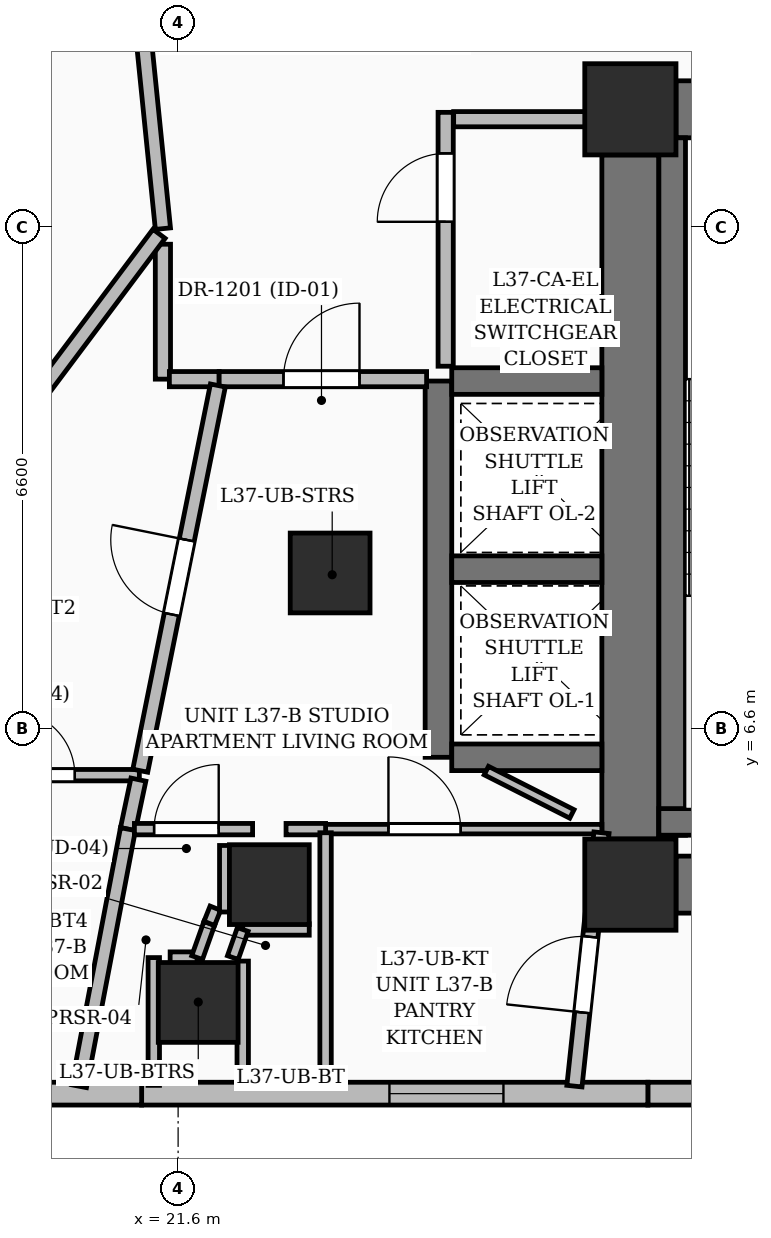
"""IFC4 building model, lengths in metres.
Left out: names, types, materials, properties, quantities, classifications, styles, units other than length and angle.
Written with IfcOpenShell. Run it as: python <this file> out.ifc"""

import sys

from ifc_helpers import new_model, si_unit, direction, frame, frame_2d, origin, origin_2d, place, context, subcontext, project, spatial, rectangle, extrude, element, fill, save


model = new_model("IFC4")
c1 = context("Model", 3, precision=1e-05, world=origin(), true_north=direction((0.0, 1.0)))
c2 = subcontext(c1, "Body", "Model", "MODEL_VIEW")
j1 = project(units=[si_unit("LENGTHUNIT", "METRE"), si_unit("PLANEANGLEUNIT", "RADIAN")], contexts=[c1])
p1 = place(None, origin())
s1 = spatial("IfcSite", under=j1, at=p1, CompositionType="ELEMENT")
p2 = place(p1, origin())
s2 = spatial("IfcBuilding", under=s1, at=p2, CompositionType="ELEMENT")
p3 = place(p2, frame((0.0, 0.0, 146.4)))
s3 = spatial("IfcBuildingStorey", under=s2, at=p3, CompositionType="ELEMENT", Elevation=146.4)
for number, where, z_axis, x_axis in (
    (1, (27.55, 4.55, 0.0), (0.0, 0.0, 1.0), (1.0, 0.0, 0.0)),
    (2, (27.55, 14.75, 0.0), (0.0, 0.0, 1.0), (1.0, 0.0, 0.0)),
):
    element("IfcColumn", number, at=place(p3, frame(where, z_axis=z_axis, x_axis=x_axis)), inside=s3, PredefinedType="COLUMN", context=c2, shape_type="SweptSolid", body=[
        extrude(rectangle(XDim=1.2, YDim=1.2, at=origin_2d()), origin(), (0.0, 0.0, 1.0), 3.6),
    ])
for number, where, z_axis, x_axis in (
    (3, (22.8, 4.55, 0.0), (0.0, 0.0, 1.0), (1.0, 0.0, 0.0)),
    (4, (23.6, 8.65, 0.0), (0.0, 0.0, 1.0), (1.0, 0.0, 0.0)),
):
    element("IfcColumn", number, at=place(p3, frame(where, z_axis=z_axis, x_axis=x_axis)), inside=s3, PredefinedType="COLUMN", context=c2, shape_type="SweptSolid", body=[
        extrude(rectangle(XDim=1.05, YDim=1.05, at=origin_2d()), origin(), (0.0, 0.0, 1.0), 3.6),
    ])
p4 = place(p3, frame((28.15, 4.55, 0.0), z_axis=(0.0, 0.0, 1.0), x_axis=(1.0, 0.0, 0.0)))
e5 = element("IfcWall", 5, at=p4, inside=s3, PredefinedType="SHEAR", context=c2, shape_type="SweptSolid", body=[
    extrude(rectangle(XDim=6.4, YDim=0.75, at=frame_2d((3.2, 0.0))), origin(), (0.0, 0.0, 1.0), 3.6),
])
p5 = place(p3, frame((28.15, 14.75, 0.0), z_axis=(0.0, 0.0, 1.0), x_axis=(1.0, 0.0, 0.0)))
e6 = element("IfcWall", 6, at=p5, inside=s3, PredefinedType="SHEAR", context=c2, shape_type="SweptSolid", body=[
    extrude(rectangle(XDim=6.4, YDim=0.75, at=frame_2d((3.2, 0.0))), origin(), (0.0, 0.0, 1.0), 3.6),
])
p6 = place(p5, frame((1.025, 0.0, 0.0)))
e7 = element("IfcOpeningElement", 7, at=p6, cuts=e6, PredefinedType="OPENING", context=c2, shape_type="SweptSolid", body=[
    extrude(rectangle(XDim=1.05, YDim=2.15, at=frame_2d((0.525, 1.075))), frame((0.0, 0.385, 0.0), z_axis=(0.0, -1.0, 0.0), x_axis=(1.0, 0.0, 0.0)), (0.0, 0.0, 1.0), 0.77),
])
p7 = place(p5, frame((3.8, 0.0, 0.0)))
e8 = element("IfcOpeningElement", 8, at=p7, cuts=e6, PredefinedType="OPENING", context=c2, shape_type="SweptSolid", body=[
    extrude(rectangle(XDim=1.1, YDim=2.2, at=frame_2d((0.55, 1.1))), frame((0.0, 0.385, 0.0), z_axis=(0.0, -1.0, 0.0), x_axis=(1.0, 0.0, 0.0)), (0.0, 0.0, 1.0), 0.77),
])
p8 = place(p3, frame((27.55, 5.15, 0.0), z_axis=(0.0, 0.0, 1.0), x_axis=(0.0, 1.0, 0.0)))
e9 = element("IfcWall", 9, at=p8, inside=s3, PredefinedType="SHEAR", context=c2, shape_type="SweptSolid", body=[
    extrude(rectangle(XDim=9.0, YDim=0.75, at=frame_2d((4.5, 0.0))), origin(), (0.0, 0.0, 1.0), 3.6),
])
p9 = place(p3, frame((28.1, 5.2, 0.0), z_axis=(0.0, 0.0, 1.0), x_axis=(0.0, 1.0, 0.0)))
e10 = element("IfcWall", 10, at=p9, inside=s3, PredefinedType="SOLIDWALL", context=c2, shape_type="SweptSolid", body=[
    extrude(rectangle(XDim=9.175, YDim=0.35, at=frame_2d((4.587, 0.0))), origin(), (0.0, 0.0, 1.0), 3.6),
])
p10 = place(p3, frame((27.925, 5.375, 0.0), z_axis=(0.0, 0.0, 1.0), x_axis=(1.0, 0.0, 0.0)))
e11 = element("IfcWall", 11, at=p10, inside=s3, PredefinedType="SOLIDWALL", context=c2, shape_type="SweptSolid", body=[
    extrude(rectangle(XDim=3.55, YDim=0.35, at=frame_2d((1.775, 0.0))), origin(), (0.0, 0.0, 1.0), 3.6),
])
p11 = place(p3, frame((25.025, 6.225, 0.0), z_axis=(0.0, 0.0, 1.0), x_axis=(0.0, 1.0, 0.0)))
e12 = element("IfcWall", 12, at=p11, inside=s3, PredefinedType="SOLIDWALL", context=c2, shape_type="SweptSolid", body=[
    extrude(rectangle(XDim=4.95, YDim=0.35, at=frame_2d((2.475, 0.0))), origin(), (0.0, 0.0, 1.0), 3.6),
])
for number, where, z_axis, x_axis in (
    (13, (25.2, 6.225, 0.0), (0.0, 0.0, 1.0), (1.0, 0.0, 0.0)),
    (14, (25.2, 8.7, 0.0), (0.0, 0.0, 1.0), (1.0, 0.0, 0.0)),
    (15, (25.2, 11.175, 0.0), (0.0, 0.0, 1.0), (1.0, 0.0, 0.0)),
):
    element("IfcWall", number, at=place(p3, frame(where, z_axis=z_axis, x_axis=x_axis)), inside=s3, PredefinedType="SOLIDWALL", context=c2, shape_type="SweptSolid", body=[
        extrude(rectangle(XDim=1.975, YDim=0.35, at=frame_2d((0.988, 0.0))), origin(), (0.0, 0.0, 1.0), 3.6),
    ])
p12 = place(p3, frame((21.864, 3.0, 0.0), z_axis=(0.0, 0.0, 1.0), x_axis=(1.0, 0.0, 0.0)))
e16 = element("IfcColumn", 16, at=p12, inside=s3, PredefinedType="COLUMN", context=c2, shape_type="SweptSolid", body=[
    extrude(rectangle(XDim=1.05, YDim=1.05, at=origin_2d()), origin(), (0.0, 0.0, 1.0), 3.6),
])
p13 = place(p3, frame((34.16, 1.8, 0.0), z_axis=(0.0, 0.0, 1.0), x_axis=(-1.0, 0.0, 0.0)))
e17 = element("IfcWall", 17, at=p13, inside=s3, PredefinedType="SOLIDWALL", context=c2, shape_type="SweptSolid", body=[
    extrude(rectangle(XDim=6.38, YDim=0.3, at=frame_2d((3.19, 0.0))), origin(), (0.0, 0.0, 1.0), 3.35),
])
p14 = place(p13, frame((2.195, 0.0, 0.55)))
e18 = element("IfcOpeningElement", 18, at=p14, cuts=e17, PredefinedType="OPENING", context=c2, shape_type="SweptSolid", body=[
    extrude(rectangle(XDim=1.6, YDim=2.2, at=frame_2d((0.8, 1.1))), frame((0.0, 0.16, 0.0), z_axis=(0.0, -1.0, 0.0), x_axis=(1.0, 0.0, 0.0)), (0.0, 0.0, 1.0), 0.32),
])
p15 = place(p3, frame((27.78, 1.8, 0.0), z_axis=(0.0, 0.0, 1.0), x_axis=(-1.0, 0.0, 0.0)))
e19 = element("IfcWall", 19, at=p15, inside=s3, PredefinedType="SOLIDWALL", context=c2, shape_type="SweptSolid", body=[
    extrude(rectangle(XDim=6.66, YDim=0.3, at=frame_2d((3.33, 0.0))), origin(), (0.0, 0.0, 1.0), 3.35),
])
p16 = place(p15, frame((1.9, 0.0, 0.6)))
e20 = element("IfcOpeningElement", 20, at=p16, cuts=e19, PredefinedType="OPENING", context=c2, shape_type="SweptSolid", body=[
    extrude(rectangle(XDim=1.5, YDim=2.1, at=frame_2d((0.75, 1.05))), frame((0.0, 0.16, 0.0), z_axis=(0.0, -1.0, 0.0), x_axis=(1.0, 0.0, 0.0)), (0.0, 0.0, 1.0), 0.32),
])
p17 = place(p3, frame((21.12, 1.8, 0.0), z_axis=(0.0, 0.0, 1.0), x_axis=(-1.0, 0.0, 0.0)))
e21 = element("IfcWall", 21, at=p17, inside=s3, PredefinedType="SOLIDWALL", context=c2, shape_type="SweptSolid", body=[
    extrude(rectangle(XDim=6.66, YDim=0.3, at=frame_2d((3.33, 0.0))), origin(), (0.0, 0.0, 1.0), 3.35),
])
p18 = place(p17, frame((3.3, 0.0, 0.8)))
e22 = element("IfcOpeningElement", 22, at=p18, cuts=e21, PredefinedType="OPENING", context=c2, shape_type="SweptSolid", body=[
    extrude(rectangle(XDim=1.2, YDim=1.8, at=frame_2d((0.6, 0.9))), frame((0.0, 0.16, 0.0), z_axis=(0.0, -1.0, 0.0), x_axis=(1.0, 0.0, 0.0)), (0.0, 0.0, 1.0), 0.32),
])
p19 = place(p3, frame((25.12, 11.37, 0.0), z_axis=(0.0, 0.0, 1.0), x_axis=(0.0, 1.0, 0.0)))
e23 = element("IfcWall", 23, at=p19, inside=s3, PredefinedType="PARTITIONING", context=c2, shape_type="SweptSolid", body=[
    extrude(rectangle(XDim=3.34, YDim=0.2, at=frame_2d((1.67, 0.0))), origin(), (0.0, 0.0, 1.0), 3.35),
])
p20 = place(p19, frame((1.9, 0.0, 0.0)))
e24 = element("IfcOpeningElement", 24, at=p20, cuts=e23, PredefinedType="OPENING", context=c2, shape_type="SweptSolid", body=[
    extrude(rectangle(XDim=0.9, YDim=2.1, at=frame_2d((0.45, 1.05))), frame((0.0, 0.11, 0.0), z_axis=(0.0, -1.0, 0.0), x_axis=(1.0, 0.0, 0.0)), (0.0, 0.0, 1.0), 0.22),
])
p21 = place(p3, frame((25.225, 14.62, 0.0), z_axis=(0.0, 0.0, 1.0), x_axis=(1.0, 0.0, 0.0)))
e25 = element("IfcWall", 25, at=p21, inside=s3, PredefinedType="PARTITIONING", context=c2, shape_type="SweptSolid", body=[
    extrude(rectangle(XDim=1.935, YDim=0.2, at=frame_2d((0.967, 0.0))), origin(), (0.0, 0.0, 1.0), 3.35),
])
p22 = place(p3, frame((21.4, 12.975, 0.0), z_axis=(0.0, 0.0, 1.0), x_axis=(0.0, -1.0, 0.0)))
e26 = element("IfcWall", 26, at=p22, inside=s3, PredefinedType="PARTITIONING", context=c2, shape_type="SweptSolid", body=[
    extrude(rectangle(XDim=1.775, YDim=0.2, at=frame_2d((0.888, 0.0))), origin(), (0.0, 0.0, 1.0), 3.35),
])
p23 = place(p3, frame((21.485, 11.2, 0.0), z_axis=(0.0, 0.0, 1.0), x_axis=(1.0, 0.0, 0.0)))
e27 = element("IfcWall", 27, at=p23, inside=s3, PredefinedType="PARTITIONING", context=c2, shape_type="SweptSolid", body=[
    extrude(rectangle(XDim=0.655, YDim=0.2, at=frame_2d((0.327, 0.0))), origin(), (0.0, 0.0, 1.0), 2.787),
])
p24 = place(p3, frame((22.14, 11.2, 0.0), z_axis=(0.0, 0.0, 1.0), x_axis=(1.0, 0.0, 0.0)))
e28 = element("IfcWall", 28, at=p24, inside=s3, PredefinedType="PARTITIONING", context=c2, shape_type="SweptSolid", body=[
    extrude(rectangle(XDim=2.729, YDim=0.2, at=frame_2d((1.365, 0.0))), origin(), (0.0, 0.0, 1.0), 3.35),
])
p25 = place(p24, frame((0.846, 0.0, 0.0)))
e29 = element("IfcOpeningElement", 29, at=p25, cuts=e28, PredefinedType="OPENING", context=c2, shape_type="SweptSolid", body=[
    extrude(rectangle(XDim=1.0, YDim=2.2, at=frame_2d((0.5, 1.1))), frame((0.0, 0.11, 0.0), z_axis=(0.0, -1.0, 0.0), x_axis=(1.0, 0.0, 0.0)), (0.0, 0.0, 1.0), 0.22),
])
p26 = place(p3, frame((20.938, 17.744, 0.0), z_axis=(0.0, 0.0, 1.0), x_axis=(0.100694538304, -0.994917388508, 0.0)))
e30 = element("IfcWall", 30, at=p26, inside=s3, PredefinedType="PARTITIONING", context=c2, shape_type="SweptSolid", body=[
    extrude(rectangle(XDim=4.587, YDim=0.2, at=frame_2d((2.293, 0.0))), origin(), (0.0, 0.0, 1.0), 2.57),
])
p27 = place(p3, frame((18.66, 5.99, 0.0), z_axis=(0.0, 0.0, 1.0), x_axis=(1.0, 0.0, 0.0)))
e31 = element("IfcWall", 31, at=p27, inside=s3, PredefinedType="PARTITIONING", context=c2, shape_type="SweptSolid", body=[
    extrude(rectangle(XDim=2.43, YDim=0.15, at=frame_2d((1.215, 0.0))), origin(), (0.0, 0.0, 1.0), 2.57),
])
p28 = place(p27, frame((0.731, 0.0, 0.0)))
e32 = element("IfcOpeningElement", 32, at=p28, cuts=e31, PredefinedType="OPENING", context=c2, shape_type="SweptSolid", body=[
    extrude(rectangle(XDim=0.85, YDim=2.1, at=frame_2d((0.425, 1.05))), frame((0.0, 0.085, 0.0), z_axis=(0.0, -1.0, 0.0), x_axis=(1.0, 0.0, 0.0)), (0.0, 0.0, 1.0), 0.17),
])
p29 = place(p3, frame((21.102, 6.049, 0.0), z_axis=(0.0, 0.0, 1.0), x_axis=(0.197587137943, 0.9802853273, 0.0)))
e33 = element("IfcWall", 33, at=p29, inside=s3, PredefinedType="PARTITIONING", context=c2, shape_type="SweptSolid", body=[
    extrude(rectangle(XDim=5.17, YDim=0.2, at=frame_2d((2.585, 0.0))), origin(), (0.0, 0.0, 1.0), 2.393),
])
p30 = place(p29, frame((2.097, 0.0, 0.0)))
e34 = element("IfcOpeningElement", 34, at=p30, cuts=e33, PredefinedType="OPENING", context=c2, shape_type="SweptSolid", body=[
    extrude(rectangle(XDim=1.0, YDim=2.2, at=frame_2d((0.5, 1.1))), frame((0.0, 0.11, 0.0), z_axis=(0.0, -1.0, 0.0), x_axis=(1.0, 0.0, 0.0)), (0.0, 0.0, 1.0), 0.22),
])
p31 = place(p3, frame((21.349, 13.112, 0.0), z_axis=(0.0, 0.0, 1.0), x_axis=(-0.599823501839, -0.800132343204, 0.0)))
e35 = element("IfcWall", 35, at=p31, inside=s3, PredefinedType="PARTITIONING", context=c2, shape_type="SweptSolid", body=[
    extrude(rectangle(XDim=8.854, YDim=0.2, at=frame_2d((4.427, 0.0))), origin(), (0.0, 0.0, 1.0), 2.393),
])
p32 = place(p3, frame((20.94, 5.28, 0.0), z_axis=(0.0, 0.0, 1.0), x_axis=(0.206823588426, 0.978378251634, 0.0)))
e36 = element("IfcWall", 36, at=p32, inside=s3, PredefinedType="PARTITIONING", context=c2, shape_type="SweptSolid", body=[
    extrude(rectangle(XDim=0.666, YDim=0.2, at=frame_2d((0.333, 0.0))), origin(), (0.0, 0.0, 1.0), 3.35),
])
p33 = place(p3, frame((20.296, 1.898, 0.0), z_axis=(0.0, 0.0, 1.0), x_axis=(0.187066487998, 0.982347254828, 0.0)))
e37 = element("IfcWall", 37, at=p33, inside=s3, PredefinedType="PARTITIONING", context=c2, shape_type="SweptSolid", body=[
    extrude(rectangle(XDim=3.443, YDim=0.2, at=frame_2d((1.721, 0.0))), origin(), (0.0, 0.0, 1.0), 2.57),
])
p34 = place(p3, frame((23.54, 5.28, 0.0), z_axis=(0.0, 0.0, 1.0), x_axis=(1.0, 0.0, 0.0)))
e38 = element("IfcWall", 38, at=p34, inside=s3, PredefinedType="PARTITIONING", context=c2, shape_type="SweptSolid", body=[
    extrude(rectangle(XDim=3.635, YDim=0.125, at=frame_2d((1.817, 0.0))), origin(), (0.0, 0.0, 1.0), 3.35),
])
p35 = place(p34, frame((0.827, 0.0, 0.0)))
e39 = element("IfcOpeningElement", 39, at=p35, cuts=e38, PredefinedType="OPENING", context=c2, shape_type="SweptSolid", body=[
    extrude(rectangle(XDim=0.95, YDim=2.2, at=frame_2d((0.475, 1.1))), frame((0.0, 0.072, 0.0), z_axis=(0.0, -1.0, 0.0), x_axis=(1.0, 0.0, 0.0)), (0.0, 0.0, 1.0), 0.145),
])
p36 = place(p3, frame((21.025, 5.28, 0.0), z_axis=(0.0, 0.0, 1.0), x_axis=(1.0, 0.0, 0.0)))
e40 = element("IfcWall", 40, at=p36, inside=s3, PredefinedType="PARTITIONING", context=c2, shape_type="SweptSolid", body=[
    extrude(rectangle(XDim=1.555, YDim=0.15, at=frame_2d((0.778, 0.0))), origin(), (0.0, 0.0, 1.0), 3.35),
])
p37 = place(p36, frame((0.259, 0.0, 0.0)))
e41 = element("IfcOpeningElement", 41, at=p37, cuts=e40, PredefinedType="OPENING", context=c2, shape_type="SweptSolid", body=[
    extrude(rectangle(XDim=0.85, YDim=2.1, at=frame_2d((0.425, 1.05))), frame((0.0, 0.085, 0.0), z_axis=(0.0, -1.0, 0.0), x_axis=(1.0, 0.0, 0.0)), (0.0, 0.0, 1.0), 0.17),
])
p38 = place(p3, frame((23.02, 5.28, 0.0), z_axis=(0.0, 0.0, 1.0), x_axis=(1.0, 0.0, 0.0)))
e42 = element("IfcWall", 42, at=p38, inside=s3, PredefinedType="PARTITIONING", context=c2, shape_type="SweptSolid", body=[
    extrude(rectangle(XDim=0.52, YDim=0.15, at=frame_2d((0.26, 0.0))), origin(), (0.0, 0.0, 1.0), 3.35),
])
p39 = place(p3, frame((23.54, 5.232, 0.0), z_axis=(0.0, 0.0, 1.0), x_axis=(0.0, -1.0, 0.0)))
e43 = element("IfcWall", 43, at=p39, inside=s3, PredefinedType="PARTITIONING", context=c2, shape_type="SweptSolid", body=[
    extrude(rectangle(XDim=3.333, YDim=0.15, at=frame_2d((1.666, 0.0))), origin(), (0.0, 0.0, 1.0), 2.436),
])
p40 = place(p3, frame((26.814, 1.899, 0.0), z_axis=(0.0, 0.0, 1.0), x_axis=(0.106162893961, 0.994348751669, 0.0)))
e44 = element("IfcWall", 44, at=p40, inside=s3, PredefinedType="PARTITIONING", context=c2, shape_type="SweptSolid", body=[
    extrude(rectangle(XDim=3.353, YDim=0.2, at=frame_2d((1.677, 0.0))), origin(), (0.0, 0.0, 1.0), 2.57),
])
p41 = place(p40, frame((0.975, 0.0, 0.0)))
e45 = element("IfcOpeningElement", 45, at=p41, cuts=e44, PredefinedType="OPENING", context=c2, shape_type="SweptSolid", body=[
    extrude(rectangle(XDim=1.0, YDim=2.2, at=frame_2d((0.5, 1.1))), frame((0.0, 0.11, 0.0), z_axis=(0.0, -1.0, 0.0), x_axis=(1.0, 0.0, 0.0)), (0.0, 0.0, 1.0), 0.22),
])
p42 = place(p3, frame((25.655, 6.05, 0.0), z_axis=(0.0, 0.0, 1.0), x_axis=(0.892014972044, -0.452005851344, 0.0)))
e46 = element("IfcWall", 46, at=p42, inside=s3, PredefinedType="PARTITIONING", context=c2, shape_type="SweptSolid", body=[
    extrude(rectangle(XDim=1.262, YDim=0.125, at=frame_2d((0.631, 0.0))), origin(), (0.0, 0.0, 1.0), 3.35),
])
p43 = place(p3, frame((23.325, 3.96, 0.0), z_axis=(0.0, 0.0, 1.0), x_axis=(-1.0, 0.0, 0.0)))
e47 = element("IfcWall", 47, at=p43, inside=s3, PredefinedType="PARTITIONING", context=c2, shape_type="SweptSolid", body=[
    extrude(rectangle(XDim=0.875, YDim=0.15, at=frame_2d((0.438, 0.0))), origin(), (0.0, 0.0, 1.0), 3.35),
])
p44 = place(p3, frame((22.45, 3.96, 0.0), z_axis=(0.0, 0.0, 1.0), x_axis=(-0.331321182958, -0.943518030418, 0.0)))
e48 = element("IfcWall", 48, at=p44, inside=s3, PredefinedType="PARTITIONING", context=c2, shape_type="SweptSolid", body=[
    extrude(rectangle(XDim=0.392, YDim=0.15, at=frame_2d((0.196, 0.0))), origin(), (0.0, 0.0, 1.0), 3.35),
])
p45 = place(p3, frame((22.45, 3.544, 0.0), z_axis=(0.0, 0.0, 1.0), x_axis=(0.0, -1.0, 0.0)))
e49 = element("IfcWall", 49, at=p45, inside=s3, PredefinedType="PARTITIONING", context=c2, shape_type="SweptSolid", body=[
    extrude(rectangle(XDim=1.635, YDim=0.15, at=frame_2d((0.817, 0.0))), origin(), (0.0, 0.0, 1.0), 2.57),
])
p46 = place(p3, frame((21.28, 1.909, 0.0), z_axis=(0.0, 0.0, 1.0), x_axis=(0.0, 1.0, 0.0)))
e50 = element("IfcWall", 50, at=p46, inside=s3, PredefinedType="PARTITIONING", context=c2, shape_type="SweptSolid", body=[
    extrude(rectangle(XDim=1.681, YDim=0.15, at=frame_2d((0.841, 0.0))), origin(), (0.0, 0.0, 1.0), 2.57),
])
p47 = place(p3, frame((21.495, 3.59, 0.0), z_axis=(0.0, 0.0, 1.0), x_axis=(1.0, 0.0, 0.0)))
e51 = element("IfcWall", 51, at=p47, inside=s3, PredefinedType="PARTITIONING", context=c2, shape_type="SweptSolid", body=[
    extrude(rectangle(XDim=0.355, YDim=0.15, at=frame_2d((0.177, 0.0))), origin(), (0.0, 0.0, 1.0), 2.57),
])
p48 = place(p3, frame((21.85, 3.59, 0.0), z_axis=(0.0, 0.0, 1.0), x_axis=(0.334878542098, 0.942261302422, 0.0)))
e52 = element("IfcWall", 52, at=p48, inside=s3, PredefinedType="PARTITIONING", context=c2, shape_type="SweptSolid", body=[
    extrude(rectangle(XDim=0.478, YDim=0.15, at=frame_2d((0.239, 0.0))), origin(), (0.0, 0.0, 1.0), 3.35),
])
p49 = place(p3, frame((22.01, 4.04, 0.0), z_axis=(0.0, 0.0, 1.0), x_axis=(0.371781498681, 0.928320266524, 0.0)))
e53 = element("IfcWall", 53, at=p49, inside=s3, PredefinedType="PARTITIONING", context=c2, shape_type="SweptSolid", body=[
    extrude(rectangle(XDim=0.215, YDim=0.15, at=frame_2d((0.108, 0.0))), origin(), (0.0, 0.0, 1.0), 3.35),
])
p50 = place(p3, frame((22.22, 4.19, 0.0), z_axis=(0.0, 0.0, 1.0), x_axis=(0.0, 1.0, 0.0)))
e54 = element("IfcWall", 54, at=p50, inside=s3, PredefinedType="PARTITIONING", context=c2, shape_type="SweptSolid", body=[
    extrude(rectangle(XDim=0.875, YDim=0.15, at=frame_2d((0.438, 0.0))), origin(), (0.0, 0.0, 1.0), 3.35),
])
p51 = place(p16, origin())
e55 = element("IfcWindow", 55, at=p51, inside=s3, PartitioningType="SINGLE_PANEL", PredefinedType="WINDOW", context=c2, shape_type="SweptSolid", body=[
    extrude(rectangle(XDim=1.5, YDim=2.1, at=frame_2d((0.75, 1.05))), frame((0.0, 0.03, 0.0), z_axis=(0.0, -1.0, 0.0), x_axis=(1.0, 0.0, 0.0)), (0.0, 0.0, 1.0), 0.06),
])
fill(e20, e55)
p52 = place(p20, origin())
e56 = element("IfcDoor", 56, at=p52, inside=s3, OperationType="SINGLE_SWING_LEFT", PredefinedType="DOOR", context=c2, shape_type="SweptSolid", body=[
    extrude(rectangle(XDim=0.9, YDim=2.1, at=frame_2d((0.45, 1.05))), frame((0.0, 0.025, 0.0), z_axis=(0.0, -1.0, 0.0), x_axis=(1.0, 0.0, 0.0)), (0.0, 0.0, 1.0), 0.05),
])
fill(e24, e56)
p53 = place(p28, origin())
e57 = element("IfcDoor", 57, at=p53, inside=s3, OperationType="SINGLE_SWING_LEFT", PredefinedType="DOOR", context=c2, shape_type="SweptSolid", body=[
    extrude(rectangle(XDim=0.85, YDim=2.1, at=frame_2d((0.425, 1.05))), frame((0.0, 0.025, 0.0), z_axis=(0.0, -1.0, 0.0), x_axis=(1.0, 0.0, 0.0)), (0.0, 0.0, 1.0), 0.05),
])
fill(e32, e57)
p54 = place(p25, origin())
e58 = element("IfcDoor", 58, at=p54, inside=s3, OperationType="SINGLE_SWING_RIGHT", PredefinedType="DOOR", context=c2, shape_type="SweptSolid", body=[
    extrude(rectangle(XDim=1.0, YDim=2.2, at=frame_2d((0.5, 1.1))), frame((0.0, 0.025, 0.0), z_axis=(0.0, -1.0, 0.0), x_axis=(1.0, 0.0, 0.0)), (0.0, 0.0, 1.0), 0.05),
])
fill(e29, e58)
p55 = place(p35, origin())
e59 = element("IfcDoor", 59, at=p55, inside=s3, OperationType="SINGLE_SWING_LEFT", PredefinedType="DOOR", context=c2, shape_type="SweptSolid", body=[
    extrude(rectangle(XDim=0.95, YDim=2.2, at=frame_2d((0.475, 1.1))), frame((0.0, 0.025, 0.0), z_axis=(0.0, -1.0, 0.0), x_axis=(1.0, 0.0, 0.0)), (0.0, 0.0, 1.0), 0.05),
])
fill(e39, e59)
p56 = place(p37, origin())
e60 = element("IfcDoor", 60, at=p56, inside=s3, OperationType="SINGLE_SWING_RIGHT", PredefinedType="DOOR", context=c2, shape_type="SweptSolid", body=[
    extrude(rectangle(XDim=0.85, YDim=2.1, at=frame_2d((0.425, 1.05))), frame((0.0, 0.025, 0.0), z_axis=(0.0, -1.0, 0.0), x_axis=(1.0, 0.0, 0.0)), (0.0, 0.0, 1.0), 0.05),
])
fill(e41, e60)
p57 = place(p30, origin())
e61 = element("IfcDoor", 61, at=p57, inside=s3, OperationType="SINGLE_SWING_RIGHT", PredefinedType="DOOR", context=c2, shape_type="SweptSolid", body=[
    extrude(rectangle(XDim=1.0, YDim=2.2, at=frame_2d((0.5, 1.1))), frame((0.0, 0.025, 0.0), z_axis=(0.0, -1.0, 0.0), x_axis=(1.0, 0.0, 0.0)), (0.0, 0.0, 1.0), 0.05),
])
fill(e34, e61)
p58 = place(p41, origin())
e62 = element("IfcDoor", 62, at=p58, inside=s3, OperationType="SINGLE_SWING_LEFT", PredefinedType="DOOR", context=c2, shape_type="SweptSolid", body=[
    extrude(rectangle(XDim=1.0, YDim=2.2, at=frame_2d((0.5, 1.1))), frame((0.0, 0.025, 0.0), z_axis=(0.0, -1.0, 0.0), x_axis=(1.0, 0.0, 0.0)), (0.0, 0.0, 1.0), 0.05),
])
fill(e45, e62)
save(model, sys.argv[1])
